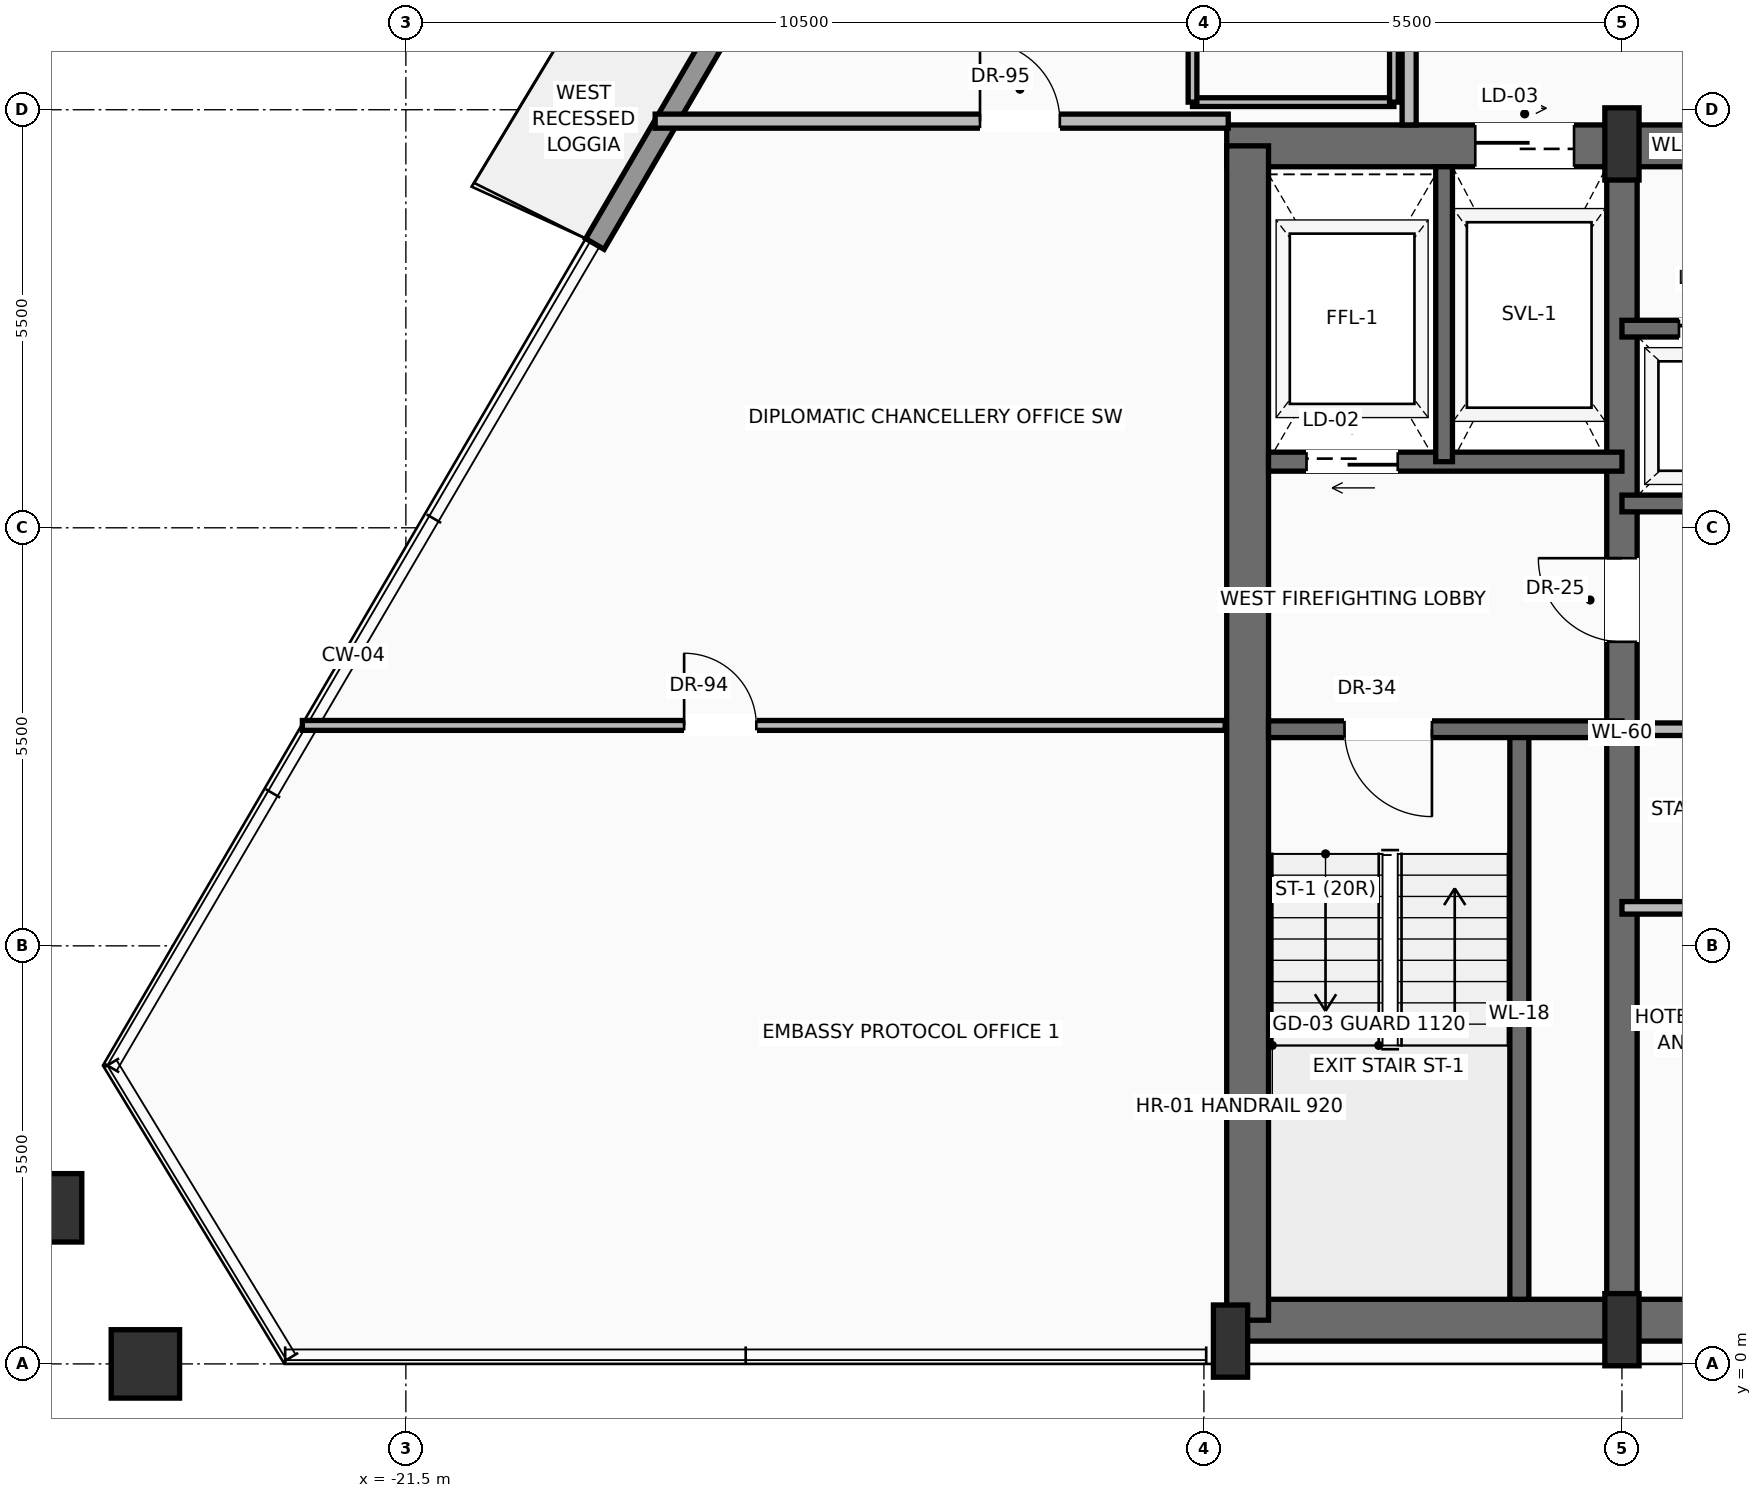
"""IFC4 building model, lengths in metres.
Left out: names, types, materials, properties, quantities, classifications, styles, units other than length and angle.
Written with IfcOpenShell. Run it as: python <this file> out.ifc"""

import sys

from ifc_helpers import new_model, si_unit, direction, frame, frame_2d, origin, origin_2d, place, context, subcontext, project, spatial, rectangle, hollow_rectangle, extrude, source, transform, mapped, element, fill, save


model = new_model("IFC4")
c1 = context("Model", 3, precision=1e-05, world=origin(), true_north=direction((0.0, 1.0)))
c2 = subcontext(c1, "Body", "Model", "MODEL_VIEW")
j1 = project(units=[si_unit("LENGTHUNIT", "METRE"), si_unit("PLANEANGLEUNIT", "RADIAN")], contexts=[c1])
p1 = place(None, origin())
s1 = spatial("IfcSite", under=j1, at=p1, CompositionType="ELEMENT")
p2 = place(p1, origin())
s2 = spatial("IfcBuilding", under=s1, at=p2, CompositionType="ELEMENT")
p3 = place(p2, frame((0.0, 0.0, 254.5)))
s3 = spatial("IfcBuildingStorey", under=s2, at=p3, CompositionType="ELEMENT", Elevation=254.5)
p4 = place(p3, frame((-10.65, 0.575, 0.0), z_axis=(0.0, 0.0, 1.0), x_axis=(1.0, 0.0, 0.0)))
e1 = element("IfcWall", 1, at=p4, inside=s3, PredefinedType="SHEAR", context=c2, shape_type="SweptSolid", body=[
    extrude(rectangle(XDim=21.3, YDim=0.55, at=frame_2d((10.65, 0.0))), origin(), (0.0, 0.0, 1.0), 3.15),
])
p5 = place(p3, frame((-10.7, 16.025, 0.0), z_axis=(0.0, 0.0, 1.0), x_axis=(1.0, 0.0, 0.0)))
e2 = element("IfcWall", 2, at=p5, inside=s3, PredefinedType="SHEAR", context=c2, shape_type="SweptSolid", body=[
    extrude(rectangle(XDim=21.4, YDim=0.55, at=frame_2d((10.7, 0.0))), origin(), (0.0, 0.0, 1.0), 3.15),
])
p6 = place(p5, frame((3.27, 0.0, 0.0)))
e3 = element("IfcOpeningElement", 3, at=p6, cuts=e2, PredefinedType="OPENING", context=c2, shape_type="SweptSolid", body=[
    extrude(rectangle(XDim=1.3, YDim=2.3, at=frame_2d((0.65, 1.15))), frame((0.0, 0.285, 0.0), z_axis=(0.0, -1.0, 0.0), x_axis=(1.0, 0.0, 0.0)), (0.0, 0.0, 1.0), 0.57),
])
p7 = place(p5, frame((9.7, 0.0, 0.0)))
e4 = element("IfcOpeningElement", 4, at=p7, cuts=e2, PredefinedType="OPENING", context=c2, shape_type="SweptSolid", body=[
    extrude(rectangle(XDim=2.0, YDim=2.4, at=frame_2d((1.0, 1.2))), frame((0.0, 0.285, 0.0), z_axis=(0.0, -1.0, 0.0), x_axis=(1.0, 0.0, 0.0)), (0.0, 0.0, 1.0), 0.57),
])
p8 = place(p3, frame((-10.425, 0.575, 0.0), z_axis=(0.0, 0.0, 1.0), x_axis=(0.0, 1.0, 0.0)))
e5 = element("IfcWall", 5, at=p8, inside=s3, PredefinedType="SHEAR", context=c2, shape_type="SweptSolid", body=[
    extrude(rectangle(XDim=15.45, YDim=0.55, at=frame_2d((7.725, 0.0))), origin(), (0.0, 0.0, 1.0), 3.15),
])
p9 = place(p3, frame((-5.5, 0.575, 0.0), z_axis=(0.0, 0.0, 1.0), x_axis=(0.0, 1.0, 0.0)))
e6 = element("IfcWall", 6, at=p9, inside=s3, PredefinedType="SHEAR", context=c2, shape_type="SweptSolid", body=[
    extrude(rectangle(XDim=15.45, YDim=0.4, at=frame_2d((7.725, 0.0))), origin(), (0.0, 0.0, 1.0), 3.15),
])
p10 = place(p9, frame((8.925, 0.0, 0.0)))
e7 = element("IfcOpeningElement", 7, at=p10, cuts=e6, PredefinedType="OPENING", context=c2, shape_type="SweptSolid", body=[
    extrude(rectangle(XDim=1.1, YDim=2.2, at=frame_2d((0.55, 1.1))), frame((0.0, 0.21, 0.0), z_axis=(0.0, -1.0, 0.0), x_axis=(1.0, 0.0, 0.0)), (0.0, 0.0, 1.0), 0.42),
])
m1 = source(origin(), c2, "Body", "SweptSolid", [
    extrude(rectangle(XDim=0.45, YDim=0.95, at=origin_2d()), origin(), (0.0, 0.0, 1.0), 3.45),
])
for number, where, z_axis, x_axis in (
    (8, (-10.65, 0.3, 0.0), (0.0, 0.0, 1.0), (1.0, 0.0, 0.0)),
    (9, (-5.5, 0.45, 0.0), (0.0, 0.0, 1.0), (1.0, 0.0, 0.0)),
    (10, (-5.5, 16.05, 0.0), (0.0, 0.0, 1.0), (1.0, 0.0, 0.0)),
):
    element("IfcColumn", number, at=place(p3, frame(where, z_axis=z_axis, x_axis=x_axis)), inside=s3, PredefinedType="PILASTER", context=c2, shape_type="MappedRepresentation", body=[
        mapped(m1, transform((0.0, 0.0, 0.0), scale=1.0)),
    ])
m2 = source(origin(), c2, "Body", "SweptSolid", [
    extrude(hollow_rectangle(XDim=0.9, YDim=0.9, WallThickness=0.045, at=origin_2d()), origin(), (0.0, 0.0, 1.0), 3.441),
])
p11 = place(p3, frame((-24.927, 0.0, 0.004), z_axis=(-0.001277047557, 0.0, 0.999999184574), x_axis=(1.0, 0.0, 0.0)))
e11 = element("IfcColumn", 11, at=p11, inside=s3, PredefinedType="COLUMN", context=c2, shape_type="MappedRepresentation", body=[
    mapped(m2, transform((0.0, 0.0, 0.0), scale=1.0)),
])
m3 = source(origin(), c2, "Body", "SweptSolid", [
    extrude(hollow_rectangle(XDim=0.9, YDim=0.9, WallThickness=0.045, at=origin_2d()), origin(), (0.0, 0.0, 1.0), 3.442),
])
p12 = place(p3, frame((-26.214, 2.053, 0.004), z_axis=(0.010569027476, -0.016882070733, 0.999801625997), x_axis=(0.847597912228, 0.530639029084, 0.0)))
e12 = element("IfcColumn", 12, at=p12, inside=s3, PredefinedType="COLUMN", context=c2, shape_type="MappedRepresentation", body=[
    mapped(m3, transform((0.0, 0.0, 0.0), scale=1.0)),
])
p13 = place(p3, frame((-19.013, 14.734, 0.0), z_axis=(0.0, 0.0, 1.0), x_axis=(0.504219118022, 0.863575752914, 0.0)))
e13 = element("IfcWall", 13, at=p13, inside=s3, PredefinedType="SOLIDWALL", context=c2, shape_type="SweptSolid", body=[
    extrude(rectangle(XDim=19.796, YDim=0.28, at=frame_2d((9.898, 0.0))), origin(), (0.0, 0.0, 1.0), 2.73),
])
p14 = place(p13, frame((4.751, 0.0, 0.0)))
e14 = element("IfcOpeningElement", 14, at=p14, cuts=e13, PredefinedType="OPENING", context=c2, shape_type="SweptSolid", body=[
    extrude(rectangle(XDim=1.6, YDim=2.35, at=frame_2d((0.8, 1.175))), frame((0.0, 0.15, 0.0), z_axis=(0.0, -1.0, 0.0), x_axis=(1.0, 0.0, 0.0)), (0.0, 0.0, 1.0), 0.3),
])
p15 = place(p3, frame((-6.85, 0.85, 0.0), z_axis=(0.0, 0.0, 1.0), x_axis=(0.0, 1.0, 0.0)))
e15 = element("IfcWall", 15, at=p15, inside=s3, PredefinedType="SOLIDWALL", context=c2, shape_type="SweptSolid", body=[
    extrude(rectangle(XDim=7.5, YDim=0.25, at=frame_2d((3.75, 0.0))), origin(), (0.0, 0.0, 1.0), 3.15),
])
p16 = place(p3, frame((-5.5, 8.35, 0.0), z_axis=(0.0, 0.0, 1.0), x_axis=(-1.0, 0.0, 0.0)))
e16 = element("IfcWall", 16, at=p16, inside=s3, PredefinedType="SOLIDWALL", context=c2, shape_type="SweptSolid", body=[
    extrude(rectangle(XDim=4.65, YDim=0.22, at=frame_2d((2.325, 0.0))), origin(), (0.0, 0.0, 1.0), 3.15),
])
p17 = place(p16, frame((2.5, 0.0, 0.0)))
e17 = element("IfcOpeningElement", 17, at=p17, cuts=e16, PredefinedType="OPENING", context=c2, shape_type="SweptSolid", body=[
    extrude(rectangle(XDim=1.15, YDim=2.2, at=frame_2d((0.575, 1.1))), frame((0.0, 0.12, 0.0), z_axis=(0.0, -1.0, 0.0), x_axis=(1.0, 0.0, 0.0)), (0.0, 0.0, 1.0), 0.24),
])
p18 = place(p3, frame((-5.5, 11.87, 0.0), z_axis=(0.0, 0.0, 1.0), x_axis=(-1.0, 0.0, 0.0)))
e18 = element("IfcWall", 18, at=p18, inside=s3, PredefinedType="SOLIDWALL", context=c2, shape_type="SweptSolid", body=[
    extrude(rectangle(XDim=4.65, YDim=0.25, at=frame_2d((2.325, 0.0))), origin(), (0.0, 0.0, 1.0), 3.15),
])
p19 = place(p18, frame((2.95, 0.0, 0.0)))
e19 = element("IfcOpeningElement", 19, at=p19, cuts=e18, PredefinedType="OPENING", context=c2, shape_type="SweptSolid", body=[
    extrude(rectangle(XDim=1.2, YDim=2.25, at=frame_2d((0.6, 1.125))), frame((0.0, 0.135, 0.0), z_axis=(0.0, -1.0, 0.0), x_axis=(1.0, 0.0, 0.0)), (0.0, 0.0, 1.0), 0.27),
])
p20 = place(p3, frame((-7.84, 11.87, 0.0), z_axis=(0.0, 0.0, 1.0), x_axis=(0.0, 1.0, 0.0)))
e20 = element("IfcWall", 20, at=p20, inside=s3, PredefinedType="SOLIDWALL", context=c2, shape_type="SweptSolid", body=[
    extrude(rectangle(XDim=3.88, YDim=0.22, at=frame_2d((1.94, 0.0))), origin(), (0.0, 0.0, 1.0), 3.15),
])
p21 = place(p3, frame((-5.5, 6.0, 0.0), z_axis=(0.0, 0.0, 1.0), x_axis=(1.0, 0.0, 0.0)))
e21 = element("IfcWall", 21, at=p21, inside=s3, PredefinedType="PARTITIONING", context=c2, shape_type="SweptSolid", body=[
    extrude(rectangle(XDim=10.8, YDim=0.165, at=frame_2d((5.4, 0.0))), origin(), (0.0, 0.0, 1.0), 3.142),
])
p22 = place(p21, frame((7.7, 0.0, 0.0)))
e22 = element("IfcOpeningElement", 22, at=p22, cuts=e21, PredefinedType="OPENING", context=c2, shape_type="SweptSolid", body=[
    extrude(rectangle(XDim=0.9, YDim=2.1, at=frame_2d((0.45, 1.05))), frame((0.0, 0.093, 0.0), z_axis=(0.0, -1.0, 0.0), x_axis=(1.0, 0.0, 0.0)), (0.0, 0.0, 1.0), 0.185),
])
p23 = place(p3, frame((-5.3, 8.35, 0.0), z_axis=(0.0, 0.0, 1.0), x_axis=(1.0, 0.0, 0.0)))
e23 = element("IfcWall", 23, at=p23, inside=s3, PredefinedType="PARTITIONING", context=c2, shape_type="SweptSolid", body=[
    extrude(rectangle(XDim=7.12, YDim=0.165, at=frame_2d((3.56, 0.0))), origin(), (0.0, 0.0, 1.0), 3.142),
])
p24 = place(p23, frame((0.85, 0.0, 0.0)))
e24 = element("IfcOpeningElement", 24, at=p24, cuts=e23, PredefinedType="OPENING", context=c2, shape_type="SweptSolid", body=[
    extrude(rectangle(XDim=0.9, YDim=2.1, at=frame_2d((0.45, 1.05))), frame((0.0, 0.093, 0.0), z_axis=(0.0, -1.0, 0.0), x_axis=(1.0, 0.0, 0.0)), (0.0, 0.0, 1.0), 0.185),
])
p25 = place(p23, frame((4.05, 0.0, 0.0)))
e25 = element("IfcOpeningElement", 25, at=p25, cuts=e23, PredefinedType="OPENING", context=c2, shape_type="SweptSolid", body=[
    extrude(rectangle(XDim=0.9, YDim=2.1, at=frame_2d((0.45, 1.05))), frame((0.0, 0.093, 0.0), z_axis=(0.0, -1.0, 0.0), x_axis=(1.0, 0.0, 0.0)), (0.0, 0.0, 1.0), 0.185),
])
p26 = place(p3, frame((-5.5, 11.32, 0.0), z_axis=(0.0, 0.0, 1.0), x_axis=(1.0, 0.0, 0.0)))
e26 = element("IfcWall", 26, at=p26, inside=s3, PredefinedType="SOLIDWALL", context=c2, shape_type="SweptSolid", body=[
    extrude(rectangle(XDim=7.32, YDim=0.22, at=frame_2d((3.66, 0.0))), origin(), (0.0, 0.0, 1.0), 3.15),
])
p27 = place(p3, frame((-5.5, 13.62, 0.0), z_axis=(0.0, 0.0, 1.0), x_axis=(1.0, 0.0, 0.0)))
e27 = element("IfcWall", 27, at=p27, inside=s3, PredefinedType="SOLIDWALL", context=c2, shape_type="SweptSolid", body=[
    extrude(rectangle(XDim=7.32, YDim=0.22, at=frame_2d((3.66, 0.0))), origin(), (0.0, 0.0, 1.0), 3.15),
])
p28 = place(p27, frame((0.75, 0.0, 0.0)))
e28 = element("IfcOpeningElement", 28, at=p28, cuts=e27, PredefinedType="OPENING", context=c2, shape_type="SweptSolid", body=[
    extrude(rectangle(XDim=1.1, YDim=2.2, at=frame_2d((0.55, 1.1))), frame((0.0, 0.12, 0.0), z_axis=(0.0, -1.0, 0.0), x_axis=(1.0, 0.0, 0.0)), (0.0, 0.0, 1.0), 0.24),
])
p29 = place(p27, frame((3.15, 0.0, 0.0)))
e29 = element("IfcOpeningElement", 29, at=p29, cuts=e27, PredefinedType="OPENING", context=c2, shape_type="SweptSolid", body=[
    extrude(rectangle(XDim=1.1, YDim=2.2, at=frame_2d((0.55, 1.1))), frame((0.0, 0.12, 0.0), z_axis=(0.0, -1.0, 0.0), x_axis=(1.0, 0.0, 0.0)), (0.0, 0.0, 1.0), 0.24),
])
p30 = place(p27, frame((5.55, 0.0, 0.0)))
e30 = element("IfcOpeningElement", 30, at=p30, cuts=e27, PredefinedType="OPENING", context=c2, shape_type="SweptSolid", body=[
    extrude(rectangle(XDim=1.1, YDim=2.2, at=frame_2d((0.55, 1.1))), frame((0.0, 0.12, 0.0), z_axis=(0.0, -1.0, 0.0), x_axis=(1.0, 0.0, 0.0)), (0.0, 0.0, 1.0), 0.24),
])
p31 = place(p3, frame((-8.3, 16.3, 0.0), z_axis=(0.0, 0.0, 1.0), x_axis=(0.0, 1.0, 0.0)))
e31 = element("IfcWall", 31, at=p31, inside=s3, PredefinedType="PARTITIONING", context=c2, shape_type="SweptSolid", body=[
    extrude(rectangle(XDim=12.1, YDim=0.185, at=frame_2d((6.05, 0.0))), origin(), (0.0, 0.0, 1.0), 3.142),
])
p32 = place(p31, frame((3.118, 0.0, 0.0)))
e32 = element("IfcOpeningElement", 32, at=p32, cuts=e31, PredefinedType="OPENING", context=c2, shape_type="SweptSolid", body=[
    extrude(rectangle(XDim=1.05, YDim=2.25, at=frame_2d((0.525, 1.125))), frame((0.0, 0.103, 0.0), z_axis=(0.0, -1.0, 0.0), x_axis=(1.0, 0.0, 0.0)), (0.0, 0.0, 1.0), 0.205),
])
p33 = place(p31, frame((7.696, 0.0, 0.0)))
e33 = element("IfcOpeningElement", 33, at=p33, cuts=e31, PredefinedType="OPENING", context=c2, shape_type="SweptSolid", body=[
    extrude(rectangle(XDim=1.05, YDim=2.25, at=frame_2d((0.525, 1.125))), frame((0.0, 0.103, 0.0), z_axis=(0.0, -1.0, 0.0), x_axis=(1.0, 0.0, 0.0)), (0.0, 0.0, 1.0), 0.205),
])
p34 = place(p3, frame((-18.22, 16.35, 0.0), z_axis=(0.0, 0.0, 1.0), x_axis=(1.0, 0.0, 0.0)))
e34 = element("IfcWall", 34, at=p34, inside=s3, PredefinedType="PARTITIONING", context=c2, shape_type="SweptSolid", body=[
    extrude(rectangle(XDim=7.54, YDim=0.185, at=frame_2d((3.77, 0.0))), origin(), (0.0, 0.0, 1.0), 3.142),
])
p35 = place(p34, frame((4.274, 0.0, 0.0)))
e35 = element("IfcOpeningElement", 35, at=p35, cuts=e34, PredefinedType="OPENING", context=c2, shape_type="SweptSolid", body=[
    extrude(rectangle(XDim=1.05, YDim=2.25, at=frame_2d((0.525, 1.125))), frame((0.0, 0.103, 0.0), z_axis=(0.0, -1.0, 0.0), x_axis=(1.0, 0.0, 0.0)), (0.0, 0.0, 1.0), 0.205),
])
p36 = place(p3, frame((-22.862, 8.4, 0.0), z_axis=(0.0, 0.0, 1.0), x_axis=(1.0, 0.0, 0.0)))
e36 = element("IfcWall", 36, at=p36, inside=s3, PredefinedType="PARTITIONING", context=c2, shape_type="SweptSolid", body=[
    extrude(rectangle(XDim=12.142, YDim=0.13, at=frame_2d((6.071, 0.0))), origin(), (0.0, 0.0, 1.0), 3.142),
])
p37 = place(p36, frame((5.023, 0.0, 0.0)))
e37 = element("IfcOpeningElement", 37, at=p37, cuts=e36, PredefinedType="OPENING", context=c2, shape_type="SweptSolid", body=[
    extrude(rectangle(XDim=0.95, YDim=2.2, at=frame_2d((0.475, 1.1))), frame((0.0, 0.075, 0.0), z_axis=(0.0, -1.0, 0.0), x_axis=(1.0, 0.0, 0.0)), (0.0, 0.0, 1.0), 0.15),
])
p38 = place(p3, frame((-11.15, 16.6, 0.0), z_axis=(0.0, 0.0, 1.0), x_axis=(1.0, 0.0, 0.0)))
e38 = element("IfcWall", 38, at=p38, inside=s3, PredefinedType="PARTITIONING", context=c2, shape_type="SweptSolid", body=[
    extrude(rectangle(XDim=2.65, YDim=0.115, at=frame_2d((1.325, 0.0))), origin(), (0.0, 0.0, 1.0), 3.142),
])
p39 = place(p3, frame((-11.15, 16.6, 0.0), z_axis=(0.0, 0.0, 1.0), x_axis=(0.0, 1.0, 0.0)))
e39 = element("IfcWall", 39, at=p39, inside=s3, PredefinedType="PARTITIONING", context=c2, shape_type="SweptSolid", body=[
    extrude(rectangle(XDim=2.4, YDim=0.115, at=frame_2d((1.2, 0.0))), origin(), (0.0, 0.0, 1.0), 3.142),
])
p40 = place(p39, frame((0.75, 0.0, 0.0)))
e40 = element("IfcOpeningElement", 40, at=p40, cuts=e39, PredefinedType="OPENING", context=c2, shape_type="SweptSolid", body=[
    extrude(rectangle(XDim=0.9, YDim=2.15, at=frame_2d((0.45, 1.075))), frame((0.0, 0.067, 0.0), z_axis=(0.0, -1.0, 0.0), x_axis=(1.0, 0.0, 0.0)), (0.0, 0.0, 1.0), 0.135),
])
p41 = place(p3, frame((-8.5, 16.6, 0.0), z_axis=(0.0, 0.0, 1.0), x_axis=(0.0, 1.0, 0.0)))
e41 = element("IfcWall", 41, at=p41, inside=s3, PredefinedType="PARTITIONING", context=c2, shape_type="SweptSolid", body=[
    extrude(rectangle(XDim=2.4, YDim=0.115, at=frame_2d((1.2, 0.0))), origin(), (0.0, 0.0, 1.0), 3.142),
])
m4 = source(origin(), c2, "Body", "SweptSolid", [
    extrude(rectangle(XDim=1.15, YDim=2.2, at=frame_2d((0.575, 1.1))), frame((0.0, 0.025, 0.0), z_axis=(0.0, -1.0, 0.0), x_axis=(1.0, 0.0, 0.0)), (0.0, 0.0, 1.0), 0.05),
])
p42 = place(p17, origin())
e42 = element("IfcDoor", 42, at=p42, inside=s3, OperationType="SINGLE_SWING_LEFT", PredefinedType="DOOR", context=c2, shape_type="MappedRepresentation", body=[
    mapped(m4, transform((0.0, 0.0, 0.0), scale=1.0)),
])
fill(e17, e42)
m5 = source(origin(), c2, "Body", "SweptSolid", [
    extrude(rectangle(XDim=1.1, YDim=2.2, at=frame_2d((0.55, 1.1))), frame((0.0, 0.025, 0.0), z_axis=(0.0, -1.0, 0.0), x_axis=(1.0, 0.0, 0.0)), (0.0, 0.0, 1.0), 0.05),
])
p43 = place(p10, origin())
e43 = element("IfcDoor", 43, at=p43, inside=s3, OperationType="SINGLE_SWING_RIGHT", PredefinedType="DOOR", context=c2, shape_type="MappedRepresentation", body=[
    mapped(m5, transform((0.0, 0.0, 0.0), scale=1.0)),
])
fill(e7, e43)
m6 = source(origin(), c2, "Body", "SweptSolid", [
    extrude(rectangle(XDim=1.2, YDim=2.25, at=frame_2d((0.6, 1.125))), frame((0.0, 0.025, 0.0), z_axis=(0.0, -1.0, 0.0), x_axis=(1.0, 0.0, 0.0)), (0.0, 0.0, 1.0), 0.05),
])
p44 = place(p19, origin())
e44 = element("IfcDoor", 44, at=p44, inside=s3, OperationType="SLIDING_TO_LEFT", PredefinedType="DOOR", context=c2, shape_type="MappedRepresentation", body=[
    mapped(m6, transform((0.0, 0.0, 0.0), scale=1.0)),
])
fill(e19, e44)
m7 = source(origin(), c2, "Body", "SweptSolid", [
    extrude(rectangle(XDim=1.3, YDim=2.3, at=frame_2d((0.65, 1.15))), frame((0.0, 0.025, 0.0), z_axis=(0.0, -1.0, 0.0), x_axis=(1.0, 0.0, 0.0)), (0.0, 0.0, 1.0), 0.05),
])
p45 = place(p6, origin())
e45 = element("IfcDoor", 45, at=p45, inside=s3, OperationType="SLIDING_TO_RIGHT", PredefinedType="DOOR", context=c2, shape_type="MappedRepresentation", body=[
    mapped(m7, transform((0.0, 0.0, 0.0), scale=1.0)),
])
fill(e3, e45)
m8 = source(origin(), c2, "Body", "SweptSolid", [
    extrude(rectangle(XDim=1.1, YDim=2.2, at=frame_2d((0.55, 1.1))), frame((0.0, 0.025, 0.0), z_axis=(0.0, -1.0, 0.0), x_axis=(1.0, 0.0, 0.0)), (0.0, 0.0, 1.0), 0.05),
])
p46 = place(p28, origin())
e46 = element("IfcDoor", 46, at=p46, inside=s3, OperationType="SLIDING_TO_RIGHT", PredefinedType="DOOR", context=c2, shape_type="MappedRepresentation", body=[
    mapped(m8, transform((0.0, 0.0, 0.0), scale=1.0)),
])
fill(e28, e46)
m9 = source(origin(), c2, "Body", "SweptSolid", [
    extrude(rectangle(XDim=1.05, YDim=2.25, at=frame_2d((0.525, 1.125))), frame((0.0, 0.025, 0.0), z_axis=(0.0, -1.0, 0.0), x_axis=(1.0, 0.0, 0.0)), (0.0, 0.0, 1.0), 0.05),
])
p47 = place(p35, origin())
e47 = element("IfcDoor", 47, at=p47, inside=s3, OperationType="SINGLE_SWING_LEFT", PredefinedType="DOOR", context=c2, shape_type="MappedRepresentation", body=[
    mapped(m9, transform((0.0, 0.0, 0.0), scale=1.0)),
])
fill(e35, e47)
m10 = source(origin(), c2, "Body", "SweptSolid", [
    extrude(rectangle(XDim=0.95, YDim=2.2, at=frame_2d((0.475, 1.1))), frame((0.0, 0.025, 0.0), z_axis=(0.0, -1.0, 0.0), x_axis=(1.0, 0.0, 0.0)), (0.0, 0.0, 1.0), 0.05),
])
p48 = place(p37, origin())
e48 = element("IfcDoor", 48, at=p48, inside=s3, OperationType="SINGLE_SWING_LEFT", PredefinedType="DOOR", context=c2, shape_type="MappedRepresentation", body=[
    mapped(m10, transform((0.0, 0.0, 0.0), scale=1.0)),
])
fill(e37, e48)
save(model, sys.argv[1])
